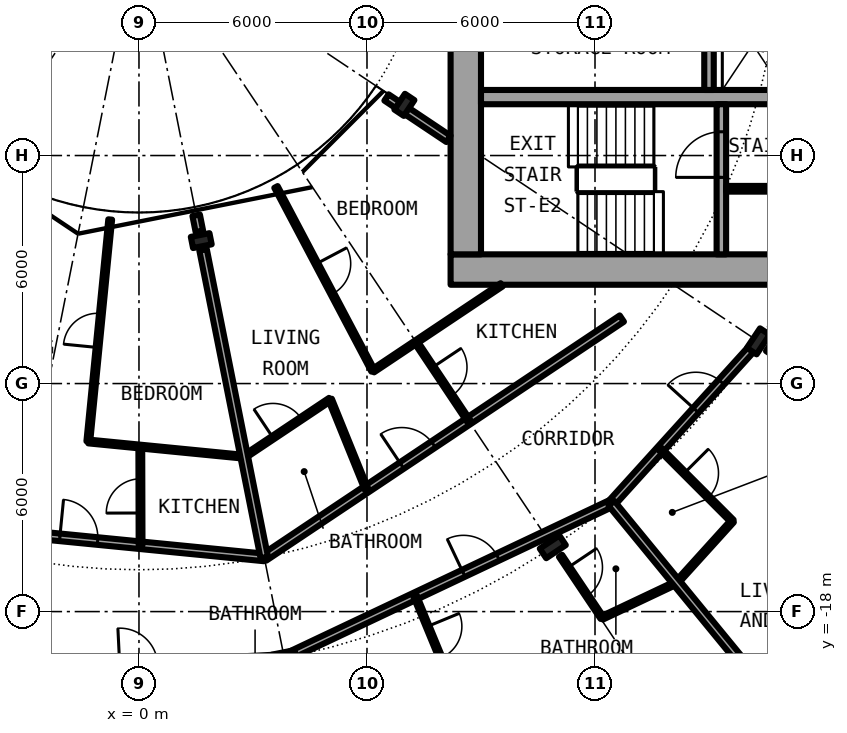
"""IFC4 building model, lengths in metres.
Left out: names, types, materials, properties, quantities, classifications, styles, units other than length and angle.
Written with IfcOpenShell. Run it as: python <this file> out.ifc"""

import sys

from ifc_helpers import new_model, si_unit, direction, frame, frame_2d, origin, origin_2d, place, context, subcontext, project, spatial, rectangle, i_section, extrude, element, fill, save


model = new_model("IFC4")
c1 = context("Model", 3, precision=1e-05, world=origin(), true_north=direction((0.0, 1.0)))
c2 = subcontext(c1, "Body", "Model", "MODEL_VIEW")
j1 = project(units=[si_unit("LENGTHUNIT", "METRE"), si_unit("PLANEANGLEUNIT", "RADIAN")], contexts=[c1])
p1 = place(None, origin())
s1 = spatial("IfcSite", under=j1, at=p1, CompositionType="ELEMENT")
p2 = place(p1, origin())
s2 = spatial("IfcBuilding", under=s1, at=p2, CompositionType="ELEMENT")
p3 = place(p2, frame((0.0, 0.0, 22.8)))
s3 = spatial("IfcBuildingStorey", under=s2, at=p3, CompositionType="ELEMENT", Elevation=22.8)
for number, where, z_axis, x_axis in (
    (1, (3.824, -19.223, 0.0), (0.0, 0.0, 1.0), (0.195, -0.981, 0.0)),
    (2, (10.889, -16.297, 0.0), (0.0, 0.0, 1.0), (0.556, -0.831, 0.0)),
    (3, (16.297, -10.889, 0.0), (0.0, 0.0, 1.0), (0.831, -0.556, 0.0)),
):
    element("IfcColumn", number, at=place(p3, frame(where, z_axis=z_axis, x_axis=x_axis)), inside=s3, PredefinedType="COLUMN", context=c2, shape_type="SweptSolid", body=[
        extrude(i_section(OverallWidth=0.305, OverallDepth=0.62, WebThickness=0.021, FlangeThickness=0.04, FilletRadius=0.027, at=origin_2d()), origin(), (0.0, 0.0, 1.0), 3.05),
    ])
for number, where, z_axis, x_axis in (
    (4, (1.639, -8.239, 0.0), (0.0, 0.0, 1.0), (0.195, -0.981, 0.0)),
    (5, (6.984, -4.667, 0.0), (0.0, 0.0, 1.0), (0.831, -0.556, 0.0)),
):
    element("IfcColumn", number, at=place(p3, frame(where, z_axis=z_axis, x_axis=x_axis)), inside=s3, PredefinedType="COLUMN", context=c2, shape_type="SweptSolid", body=[
        extrude(i_section(OverallWidth=0.3, OverallDepth=0.5, WebThickness=0.014, FlangeThickness=0.028, FilletRadius=0.027, at=origin_2d()), origin(), (0.0, 0.0, 1.0), 3.05),
    ])
p4 = place(p3, frame((8.2, -9.0, 0.0), z_axis=(0.0, 0.0, 1.0), x_axis=(1.0, 0.0, 0.0)))
e6 = element("IfcWall", 6, at=p4, inside=s3, PredefinedType="SHEAR", context=c2, shape_type="SweptSolid", body=[
    extrude(rectangle(XDim=14.2, YDim=0.8, at=frame_2d((7.1, 0.0))), origin(), (0.0, 0.0, 1.0), 3.05),
])
p5 = place(p4, frame((11.675, 0.0, 0.0)))
e7 = element("IfcOpeningElement", 7, at=p5, cuts=e6, PredefinedType="OPENING", context=c2, shape_type="SweptSolid", body=[
    extrude(rectangle(XDim=1.2, YDim=2.3, at=frame_2d((0.6, 1.15))), frame((0.0, 0.41, 0.0), z_axis=(0.0, -1.0, 0.0), x_axis=(1.0, 0.0, 0.0)), (0.0, 0.0, 1.0), 0.82),
])
p6 = place(p3, frame((8.6, -8.6, 0.0), z_axis=(0.0, 0.0, 1.0), x_axis=(0.0, 1.0, 0.0)))
e8 = element("IfcWall", 8, at=p6, inside=s3, PredefinedType="SHEAR", context=c2, shape_type="SweptSolid", body=[
    extrude(rectangle(XDim=17.2, YDim=0.8, at=frame_2d((8.6, 0.0))), origin(), (0.0, 0.0, 1.0), 3.05),
])
p7 = place(p6, frame((7.4, 0.0, 0.1)))
e9 = element("IfcOpeningElement", 9, at=p7, cuts=e8, PredefinedType="OPENING", context=c2, shape_type="SweptSolid", body=[
    extrude(rectangle(XDim=2.4, YDim=2.2, at=frame_2d((1.2, 1.1))), frame((0.0, 0.41, 0.0), z_axis=(0.0, -1.0, 0.0), x_axis=(1.0, 0.0, 0.0)), (0.0, 0.0, 1.0), 0.82),
])
p8 = place(p3, frame((9.0, -4.462, 0.0), z_axis=(0.0, 0.0, 1.0), x_axis=(1.0, 0.0, 0.0)))
e10 = element("IfcWall", 10, at=p8, inside=s3, PredefinedType="SHEAR", context=c2, shape_type="SweptSolid", body=[
    extrude(rectangle(XDim=10.15, YDim=0.375, at=frame_2d((5.075, 0.0))), origin(), (0.0, 0.0, 1.0), 3.05),
])
p9 = place(p3, frame((15.325, -8.6, 0.0), z_axis=(0.0, 0.0, 1.0), x_axis=(0.0, 1.0, 0.0)))
e11 = element("IfcWall", 11, at=p9, inside=s3, PredefinedType="SHEAR", context=c2, shape_type="SweptSolid", body=[
    extrude(rectangle(XDim=3.95, YDim=0.25, at=frame_2d((1.975, 0.0))), origin(), (0.0, 0.0, 1.0), 3.05),
])
p10 = place(p9, frame((2.025, 0.0, 0.0)))
e12 = element("IfcOpeningElement", 12, at=p10, cuts=e11, PredefinedType="OPENING", context=c2, shape_type="SweptSolid", body=[
    extrude(rectangle(XDim=1.2, YDim=2.3, at=frame_2d((0.6, 1.15))), frame((0.0, 0.135, 0.0), z_axis=(0.0, -1.0, 0.0), x_axis=(1.0, 0.0, 0.0)), (0.0, 0.0, 1.0), 0.27),
])
p11 = place(p3, frame((15.0, -1.825, 0.0), z_axis=(0.0, 0.0, 1.0), x_axis=(0.0, -1.0, 0.0)))
e13 = element("IfcWall", 13, at=p11, inside=s3, PredefinedType="SOLIDWALL", context=c2, shape_type="SweptSolid", body=[
    extrude(rectangle(XDim=2.45, YDim=0.25, at=frame_2d((1.225, 0.0))), origin(), (0.0, 0.0, 1.0), 2.7),
])
p12 = place(p3, frame((15.45, -6.875, 0.0), z_axis=(0.0, 0.0, 1.0), x_axis=(1.0, 0.0, 0.0)))
e14 = element("IfcWall", 14, at=p12, inside=s3, PredefinedType="PARTITIONING", context=c2, shape_type="SweptSolid", body=[
    extrude(rectangle(XDim=3.7, YDim=0.15, at=frame_2d((1.85, 0.0))), origin(), (0.0, 0.0, 1.0), 2.7),
])
p13 = place(p12, frame((1.4, 0.0, 0.0)))
e15 = element("IfcOpeningElement", 15, at=p13, cuts=e14, PredefinedType="OPENING", context=c2, shape_type="SweptSolid", body=[
    extrude(rectangle(XDim=0.9, YDim=2.3, at=frame_2d((0.45, 1.15))), frame((0.0, 0.085, 0.0), z_axis=(0.0, -1.0, 0.0), x_axis=(1.0, 0.0, 0.0)), (0.0, 0.0, 1.0), 0.17),
])
p14 = place(p3, frame((14.153, -17.234, 0.0), z_axis=(0.0, 0.0, 1.0), x_axis=(0.671144831591, 0.741326254107, 0.0)))
e16 = element("IfcWall", 16, at=p14, inside=s3, PredefinedType="PARTITIONING", context=c2, shape_type="SweptSolid", body=[
    extrude(rectangle(XDim=2.181, YDim=0.1, at=frame_2d((1.091, 0.0))), origin(), (0.0, 0.0, 1.0), 2.7),
])
p15 = place(p3, frame((12.188, -18.165, 0.0), z_axis=(0.0, 0.0, 1.0), x_axis=(0.903905215872, 0.427732814639, 0.0)))
e17 = element("IfcWall", 17, at=p15, inside=s3, PredefinedType="PARTITIONING", context=c2, shape_type="SweptSolid", body=[
    extrude(rectangle(XDim=2.167, YDim=0.1, at=frame_2d((1.083, 0.0))), origin(), (0.0, 0.0, 1.0), 2.7),
])
p16 = place(p3, frame((12.434, -15.151, 0.0), z_axis=(0.0, 0.0, 1.0), x_axis=(0.671514934772, 0.740991020444, 0.0)))
e18 = element("IfcWall", 18, at=p16, inside=s3, PredefinedType="PARTITIONING", context=c2, shape_type="SweptSolid", body=[
    extrude(rectangle(XDim=5.598, YDim=0.2, at=frame_2d((2.799, 0.0))), origin(), (0.0, 0.0, 1.0), 2.38),
])
p17 = place(p16, frame((3.305, 0.0, 0.0)))
e19 = element("IfcOpeningElement", 19, at=p17, cuts=e18, PredefinedType="OPENING", context=c2, shape_type="SweptSolid", body=[
    extrude(rectangle(XDim=1.0, YDim=2.3, at=frame_2d((0.5, 1.15))), frame((0.0, 0.11, 0.0), z_axis=(0.0, -1.0, 0.0), x_axis=(1.0, 0.0, 0.0)), (0.0, 0.0, 1.0), 0.22),
])
p18 = place(p3, frame((-10.741, -16.35, 0.0), z_axis=(0.0, 0.0, 1.0), x_axis=(0.941539496009, -0.336902623105, 0.0)))
e20 = element("IfcWall", 20, at=p18, inside=s3, PredefinedType="PARTITIONING", context=c2, shape_type="SweptSolid", body=[
    extrude(rectangle(XDim=9.368, YDim=0.2, at=frame_2d((4.684, 0.0))), origin(), (0.0, 0.0, 1.0), 2.38),
])
p19 = place(p18, frame((5.057, 0.0, 0.0)))
e21 = element("IfcOpeningElement", 21, at=p19, cuts=e20, PredefinedType="OPENING", context=c2, shape_type="SweptSolid", body=[
    extrude(rectangle(XDim=1.0, YDim=2.3, at=frame_2d((0.5, 1.15))), frame((0.0, 0.11, 0.0), z_axis=(0.0, -1.0, 0.0), x_axis=(1.0, 0.0, 0.0)), (0.0, 0.0, 1.0), 0.22),
])
p20 = place(p3, frame((3.966, -19.156, 0.0), z_axis=(0.0, 0.0, 1.0), x_axis=(0.90398275529, 0.427568916244, 0.0)))
e22 = element("IfcWall", 22, at=p20, inside=s3, PredefinedType="PARTITIONING", context=c2, shape_type="SweptSolid", body=[
    extrude(rectangle(XDim=9.372, YDim=0.2, at=frame_2d((4.686, 0.0))), origin(), (0.0, 0.0, 1.0), 2.38),
])
p21 = place(p20, frame((5.058, 0.0, 0.0)))
e23 = element("IfcOpeningElement", 23, at=p21, cuts=e22, PredefinedType="OPENING", context=c2, shape_type="SweptSolid", body=[
    extrude(rectangle(XDim=1.0, YDim=2.3, at=frame_2d((0.5, 1.15))), frame((0.0, 0.11, 0.0), z_axis=(0.0, -1.0, 0.0), x_axis=(1.0, 0.0, 0.0)), (0.0, 0.0, 1.0), 0.22),
])
p22 = place(p3, frame((-6.467, -15.615, 0.0), z_axis=(0.0, 0.0, 1.0), x_axis=(0.995201860711, -0.097843019361, 0.0)))
e24 = element("IfcWall", 24, at=p22, inside=s3, PredefinedType="PARTITIONING", context=c2, shape_type="SweptSolid", body=[
    extrude(rectangle(XDim=9.811, YDim=0.2, at=frame_2d((4.906, 0.0))), origin(), (0.0, 0.0, 1.0), 2.7),
])
p23 = place(p22, frame((4.405, 0.0, 0.0)))
e25 = element("IfcOpeningElement", 25, at=p23, cuts=e24, PredefinedType="OPENING", context=c2, shape_type="SweptSolid", body=[
    extrude(rectangle(XDim=1.0, YDim=2.3, at=frame_2d((0.5, 1.15))), frame((0.0, 0.11, 0.0), z_axis=(0.0, -1.0, 0.0), x_axis=(1.0, 0.0, 0.0)), (0.0, 0.0, 1.0), 0.22),
])
p24 = place(p3, frame((3.297, -16.575, 0.0), z_axis=(0.0, 0.0, 1.0), x_axis=(0.83154870872, 0.55545183862, 0.0)))
e26 = element("IfcWall", 26, at=p24, inside=s3, PredefinedType="PARTITIONING", context=c2, shape_type="SweptSolid", body=[
    extrude(rectangle(XDim=11.315, YDim=0.2, at=frame_2d((5.657, 0.0))), origin(), (0.0, 0.0, 1.0), 2.7),
])
p25 = place(p24, frame((4.352, 0.0, 0.0)))
e27 = element("IfcOpeningElement", 27, at=p25, cuts=e26, PredefinedType="OPENING", context=c2, shape_type="SweptSolid", body=[
    extrude(rectangle(XDim=1.0, YDim=2.3, at=frame_2d((0.5, 1.15))), frame((0.0, 0.11, 0.0), z_axis=(0.0, -1.0, 0.0), x_axis=(1.0, 0.0, 0.0)), (0.0, 0.0, 1.0), 0.22),
])
p26 = place(p3, frame((-1.33, -13.524, 0.0), z_axis=(0.0, 0.0, 1.0), x_axis=(0.995206960104, -0.097791137432, 0.0)))
e28 = element("IfcWall", 28, at=p26, inside=s3, PredefinedType="PARTITIONING", context=c2, shape_type="SweptSolid", body=[
    extrude(rectangle(XDim=4.122, YDim=0.1, at=frame_2d((2.061, 0.0))), origin(), (0.0, 0.0, 1.0), 2.7),
])
p27 = place(p3, frame((2.77, -13.927, 0.0), z_axis=(0.0, 0.0, 1.0), x_axis=(0.831538390496, 0.555467285384, 0.0)))
e29 = element("IfcWall", 29, at=p27, inside=s3, PredefinedType="PARTITIONING", context=c2, shape_type="SweptSolid", body=[
    extrude(rectangle(XDim=2.717, YDim=0.1, at=frame_2d((1.358, 0.0))), origin(), (0.0, 0.0, 1.0), 2.7),
])
p28 = place(p27, frame((0.908, 0.0, 0.0)))
e30 = element("IfcOpeningElement", 30, at=p28, cuts=e29, PredefinedType="OPENING", context=c2, shape_type="SweptSolid", body=[
    extrude(rectangle(XDim=0.9, YDim=2.3, at=frame_2d((0.45, 1.15))), frame((0.0, 0.06, 0.0), z_axis=(0.0, -1.0, 0.0), x_axis=(1.0, 0.0, 0.0)), (0.0, 0.0, 1.0), 0.12),
])
p29 = place(p3, frame((6.158, -11.664, 0.0), z_axis=(0.0, 0.0, 1.0), x_axis=(0.831459707426, 0.555585056429, 0.0)))
e31 = element("IfcWall", 31, at=p29, inside=s3, PredefinedType="PARTITIONING", context=c2, shape_type="SweptSolid", body=[
    extrude(rectangle(XDim=4.073, YDim=0.1, at=frame_2d((2.037, 0.0))), origin(), (0.0, 0.0, 1.0), 2.7),
])
p30 = place(p3, frame((6.513, -4.472, 0.0), z_axis=(0.0, 0.0, 1.0), x_axis=(0.831417956244, -0.555647533996, 0.0)))
e32 = element("IfcWall", 32, at=p30, inside=s3, PredefinedType="PARTITIONING", context=c2, shape_type="SweptSolid", body=[
    extrude(rectangle(XDim=1.962, YDim=0.2, at=frame_2d((0.981, 0.0))), origin(), (0.0, 0.0, 1.0), 2.7),
])
p31 = place(p3, frame((-1.333, -13.523, 0.0), z_axis=(0.0, 0.0, 1.0), x_axis=(0.098144281387, 0.995172196171, 0.0)))
e33 = element("IfcWall", 33, at=p31, inside=s3, PredefinedType="PARTITIONING", context=c2, shape_type="SweptSolid", body=[
    extrude(rectangle(XDim=5.868, YDim=0.1, at=frame_2d((2.934, 0.0))), origin(), (0.0, 0.0, 1.0), 2.7),
])
p32 = place(p31, frame((2.484, 0.0, 0.0)))
e34 = element("IfcOpeningElement", 34, at=p32, cuts=e33, PredefinedType="OPENING", context=c2, shape_type="SweptSolid", body=[
    extrude(rectangle(XDim=0.9, YDim=2.3, at=frame_2d((0.45, 1.15))), frame((0.0, 0.06, 0.0), z_axis=(0.0, -1.0, 0.0), x_axis=(1.0, 0.0, 0.0)), (0.0, 0.0, 1.0), 0.12),
])
p33 = place(p3, frame((0.042, -16.255, 0.0), z_axis=(0.0, 0.0, 1.0), x_axis=(-0.00272632248, 0.999996283576, 0.0)))
e35 = element("IfcWall", 35, at=p33, inside=s3, PredefinedType="PARTITIONING", context=c2, shape_type="SweptSolid", body=[
    extrude(rectangle(XDim=2.597, YDim=0.1, at=frame_2d((1.298, 0.0))), origin(), (0.0, 0.0, 1.0), 2.7),
])
p34 = place(p33, frame((0.849, 0.0, 0.0)))
e36 = element("IfcOpeningElement", 36, at=p34, cuts=e35, PredefinedType="OPENING", context=c2, shape_type="SweptSolid", body=[
    extrude(rectangle(XDim=0.9, YDim=2.3, at=frame_2d((0.45, 1.15))), frame((0.0, 0.06, 0.0), z_axis=(0.0, -1.0, 0.0), x_axis=(1.0, 0.0, 0.0)), (0.0, 0.0, 1.0), 0.12),
])
p35 = place(p3, frame((1.505, -7.572, 0.0), z_axis=(0.0, 0.0, 1.0), x_axis=(0.195788718323, -0.980646102209, 0.0)))
e37 = element("IfcWall", 37, at=p35, inside=s3, PredefinedType="PARTITIONING", context=c2, shape_type="SweptSolid", body=[
    extrude(rectangle(XDim=0.43, YDim=0.2, at=frame_2d((0.215, 0.0))), origin(), (0.0, 0.0, 1.0), 2.7),
])
p36 = place(p3, frame((1.687, -8.484, 0.0), z_axis=(0.0, 0.0, 1.0), x_axis=(0.195171317964, -0.980769165831, 0.0)))
e38 = element("IfcWall", 38, at=p36, inside=s3, PredefinedType="PARTITIONING", context=c2, shape_type="SweptSolid", body=[
    extrude(rectangle(XDim=8.25, YDim=0.2, at=frame_2d((4.125, 0.0))), origin(), (0.0, 0.0, 1.0), 2.7),
])
p37 = place(p3, frame((3.605, -6.827, 0.0), z_axis=(0.0, 0.0, 1.0), x_axis=(0.466976820365, -0.884269556889, 0.0)))
e39 = element("IfcWall", 39, at=p37, inside=s3, PredefinedType="PARTITIONING", context=c2, shape_type="SweptSolid", body=[
    extrude(rectangle(XDim=5.469, YDim=0.1, at=frame_2d((2.735, 0.0))), origin(), (0.0, 0.0, 1.0), 2.7),
])
p38 = place(p37, frame((2.284, 0.0, 0.0)))
e40 = element("IfcOpeningElement", 40, at=p38, cuts=e39, PredefinedType="OPENING", context=c2, shape_type="SweptSolid", body=[
    extrude(rectangle(XDim=0.9, YDim=2.3, at=frame_2d((0.45, 1.15))), frame((0.0, 0.06, 0.0), z_axis=(0.0, -1.0, 0.0), x_axis=(1.0, 0.0, 0.0)), (0.0, 0.0, 1.0), 0.12),
])
p39 = place(p3, frame((5.029, -12.418, 0.0), z_axis=(0.0, 0.0, 1.0), x_axis=(0.375649498413, -0.926761811008, 0.0)))
e41 = element("IfcWall", 41, at=p39, inside=s3, PredefinedType="PARTITIONING", context=c2, shape_type="SweptSolid", body=[
    extrude(rectangle(XDim=2.548, YDim=0.1, at=frame_2d((1.274, 0.0))), origin(), (0.0, 0.0, 1.0), 2.7),
])
p40 = place(p3, frame((7.268, -17.594, 0.0), z_axis=(0.0, 0.0, 1.0), x_axis=(0.381763497026, -0.924260045841, 0.0)))
e42 = element("IfcWall", 42, at=p40, inside=s3, PredefinedType="PARTITIONING", context=c2, shape_type="SweptSolid", body=[
    extrude(rectangle(XDim=8.138, YDim=0.1, at=frame_2d((4.069, 0.0))), origin(), (0.0, 0.0, 1.0), 2.7),
])
p41 = place(p40, frame((0.861, 0.0, 0.0)))
e43 = element("IfcOpeningElement", 43, at=p41, cuts=e42, PredefinedType="OPENING", context=c2, shape_type="SweptSolid", body=[
    extrude(rectangle(XDim=0.9, YDim=2.3, at=frame_2d((0.45, 1.15))), frame((0.0, 0.06, 0.0), z_axis=(0.0, -1.0, 0.0), x_axis=(1.0, 0.0, 0.0)), (0.0, 0.0, 1.0), 0.12),
])
p42 = place(p40, frame((4.93, 0.0, 0.0)))
e44 = element("IfcOpeningElement", 44, at=p42, cuts=e42, PredefinedType="OPENING", context=c2, shape_type="SweptSolid", body=[
    extrude(rectangle(XDim=0.9, YDim=2.3, at=frame_2d((0.45, 1.15))), frame((0.0, 0.06, 0.0), z_axis=(0.0, -1.0, 0.0), x_axis=(1.0, 0.0, 0.0)), (0.0, 0.0, 1.0), 0.12),
])
p43 = place(p3, frame((7.289, -10.908, 0.0), z_axis=(0.0, 0.0, 1.0), x_axis=(0.555625883274, -0.831432425297, 0.0)))
e45 = element("IfcWall", 45, at=p43, inside=s3, PredefinedType="PARTITIONING", context=c2, shape_type="SweptSolid", body=[
    extrude(rectangle(XDim=2.494, YDim=0.1, at=frame_2d((1.247, 0.0))), origin(), (0.0, 0.0, 1.0), 2.7),
])
p44 = place(p43, frame((0.797, 0.0, 0.0)))
e46 = element("IfcOpeningElement", 46, at=p44, cuts=e45, PredefinedType="OPENING", context=c2, shape_type="SweptSolid", body=[
    extrude(rectangle(XDim=0.9, YDim=2.3, at=frame_2d((0.45, 1.15))), frame((0.0, 0.06, 0.0), z_axis=(0.0, -1.0, 0.0), x_axis=(1.0, 0.0, 0.0)), (0.0, 0.0, 1.0), 0.12),
])
p45 = place(p3, frame((11.093, -16.533, 0.0), z_axis=(0.0, 0.0, 1.0), x_axis=(0.557134474719, -0.830422288405, 0.0)))
e47 = element("IfcWall", 47, at=p45, inside=s3, PredefinedType="PARTITIONING", context=c2, shape_type="SweptSolid", body=[
    extrude(rectangle(XDim=1.965, YDim=0.1, at=frame_2d((0.983, 0.0))), origin(), (0.0, 0.0, 1.0), 2.7),
])
p46 = place(p45, frame((0.366, 0.0, 0.0)))
e48 = element("IfcOpeningElement", 48, at=p46, cuts=e47, PredefinedType="OPENING", context=c2, shape_type="SweptSolid", body=[
    extrude(rectangle(XDim=0.9, YDim=2.3, at=frame_2d((0.45, 1.15))), frame((0.0, 0.06, 0.0), z_axis=(0.0, -1.0, 0.0), x_axis=(1.0, 0.0, 0.0)), (0.0, 0.0, 1.0), 0.12),
])
p47 = place(p3, frame((12.432, -15.152, 0.0), z_axis=(0.0, 0.0, 1.0), x_axis=(0.634353152115, -0.77304338714, 0.0)))
e49 = element("IfcWall", 49, at=p47, inside=s3, PredefinedType="PARTITIONING", context=c2, shape_type="SweptSolid", body=[
    extrude(rectangle(XDim=7.576, YDim=0.2, at=frame_2d((3.788, 0.0))), origin(), (0.0, 0.0, 1.0), 2.7),
])
p48 = place(p3, frame((13.723, -13.729, 0.0), z_axis=(0.0, 0.0, 1.0), x_axis=(0.706741540154, -0.707471833659, 0.0)))
e50 = element("IfcWall", 50, at=p48, inside=s3, PredefinedType="PARTITIONING", context=c2, shape_type="SweptSolid", body=[
    extrude(rectangle(XDim=2.674, YDim=0.1, at=frame_2d((1.337, 0.0))), origin(), (0.0, 0.0, 1.0), 2.7),
])
p49 = place(p48, frame((0.887, 0.0, 0.0)))
e51 = element("IfcOpeningElement", 51, at=p49, cuts=e50, PredefinedType="OPENING", context=c2, shape_type="SweptSolid", body=[
    extrude(rectangle(XDim=0.9, YDim=2.3, at=frame_2d((0.45, 1.15))), frame((0.0, 0.06, 0.0), z_axis=(0.0, -1.0, 0.0), x_axis=(1.0, 0.0, 0.0)), (0.0, 0.0, 1.0), 0.12),
])
p50 = place(p3, frame((16.555, -11.061, 0.0), z_axis=(0.0, 0.0, 1.0), x_axis=(0.831465568067, -0.555576285599, 0.0)))
e52 = element("IfcWall", 52, at=p50, inside=s3, PredefinedType="PARTITIONING", context=c2, shape_type="SweptSolid", body=[
    extrude(rectangle(XDim=7.264, YDim=0.2, at=frame_2d((3.632, 0.0))), origin(), (0.0, 0.0, 1.0), 2.7),
])
p51 = place(p10, origin())
e53 = element("IfcDoor", 53, at=p51, inside=s3, OperationType="SINGLE_SWING_LEFT", PredefinedType="DOOR", context=c2, shape_type="SweptSolid", body=[
    extrude(rectangle(XDim=1.2, YDim=2.3, at=frame_2d((0.6, 1.15))), frame((0.0, 0.025, 0.0), z_axis=(0.0, -1.0, 0.0), x_axis=(1.0, 0.0, 0.0)), (0.0, 0.0, 1.0), 0.05),
])
fill(e12, e53)
p52 = place(p21, origin())
e54 = element("IfcDoor", 54, at=p52, inside=s3, OperationType="SINGLE_SWING_RIGHT", PredefinedType="DOOR", context=c2, shape_type="SweptSolid", body=[
    extrude(rectangle(XDim=1.0, YDim=2.3, at=frame_2d((0.5, 1.15))), frame((0.0, 0.025, 0.0), z_axis=(0.0, -1.0, 0.0), x_axis=(1.0, 0.0, 0.0)), (0.0, 0.0, 1.0), 0.05),
])
fill(e23, e54)
p53 = place(p46, origin())
e55 = element("IfcDoor", 55, at=p53, inside=s3, OperationType="SINGLE_SWING_LEFT", PredefinedType="DOOR", context=c2, shape_type="SweptSolid", body=[
    extrude(rectangle(XDim=0.9, YDim=2.3, at=frame_2d((0.45, 1.15))), frame((0.0, 0.025, 0.0), z_axis=(0.0, -1.0, 0.0), x_axis=(1.0, 0.0, 0.0)), (0.0, 0.0, 1.0), 0.05),
])
fill(e48, e55)
p54 = place(p41, origin())
e56 = element("IfcDoor", 56, at=p54, inside=s3, OperationType="SINGLE_SWING_LEFT", PredefinedType="DOOR", context=c2, shape_type="SweptSolid", body=[
    extrude(rectangle(XDim=0.9, YDim=2.3, at=frame_2d((0.45, 1.15))), frame((0.0, 0.025, 0.0), z_axis=(0.0, -1.0, 0.0), x_axis=(1.0, 0.0, 0.0)), (0.0, 0.0, 1.0), 0.05),
])
fill(e43, e56)
p55 = place(p17, origin())
e57 = element("IfcDoor", 57, at=p55, inside=s3, OperationType="SINGLE_SWING_RIGHT", PredefinedType="DOOR", context=c2, shape_type="SweptSolid", body=[
    extrude(rectangle(XDim=1.0, YDim=2.3, at=frame_2d((0.5, 1.15))), frame((0.0, 0.025, 0.0), z_axis=(0.0, -1.0, 0.0), x_axis=(1.0, 0.0, 0.0)), (0.0, 0.0, 1.0), 0.05),
])
fill(e19, e57)
p56 = place(p49, origin())
e58 = element("IfcDoor", 58, at=p56, inside=s3, OperationType="SINGLE_SWING_RIGHT", PredefinedType="DOOR", context=c2, shape_type="SweptSolid", body=[
    extrude(rectangle(XDim=0.9, YDim=2.3, at=frame_2d((0.45, 1.15))), frame((0.0, 0.025, 0.0), z_axis=(0.0, -1.0, 0.0), x_axis=(1.0, 0.0, 0.0)), (0.0, 0.0, 1.0), 0.05),
])
fill(e51, e58)
p57 = place(p23, origin())
e59 = element("IfcDoor", 59, at=p57, inside=s3, OperationType="SINGLE_SWING_LEFT", PredefinedType="DOOR", context=c2, shape_type="SweptSolid", body=[
    extrude(rectangle(XDim=1.0, YDim=2.3, at=frame_2d((0.5, 1.15))), frame((0.0, 0.025, 0.0), z_axis=(0.0, -1.0, 0.0), x_axis=(1.0, 0.0, 0.0)), (0.0, 0.0, 1.0), 0.05),
])
fill(e25, e59)
p58 = place(p34, origin())
e60 = element("IfcDoor", 60, at=p58, inside=s3, OperationType="SINGLE_SWING_RIGHT", PredefinedType="DOOR", context=c2, shape_type="SweptSolid", body=[
    extrude(rectangle(XDim=0.9, YDim=2.3, at=frame_2d((0.45, 1.15))), frame((0.0, 0.025, 0.0), z_axis=(0.0, -1.0, 0.0), x_axis=(1.0, 0.0, 0.0)), (0.0, 0.0, 1.0), 0.05),
])
fill(e36, e60)
p59 = place(p32, origin())
e61 = element("IfcDoor", 61, at=p59, inside=s3, OperationType="SINGLE_SWING_RIGHT", PredefinedType="DOOR", context=c2, shape_type="SweptSolid", body=[
    extrude(rectangle(XDim=0.9, YDim=2.3, at=frame_2d((0.45, 1.15))), frame((0.0, 0.025, 0.0), z_axis=(0.0, -1.0, 0.0), x_axis=(1.0, 0.0, 0.0)), (0.0, 0.0, 1.0), 0.05),
])
fill(e34, e61)
p60 = place(p25, origin())
e62 = element("IfcDoor", 62, at=p60, inside=s3, OperationType="SINGLE_SWING_LEFT", PredefinedType="DOOR", context=c2, shape_type="SweptSolid", body=[
    extrude(rectangle(XDim=1.0, YDim=2.3, at=frame_2d((0.5, 1.15))), frame((0.0, 0.025, 0.0), z_axis=(0.0, -1.0, 0.0), x_axis=(1.0, 0.0, 0.0)), (0.0, 0.0, 1.0), 0.05),
])
fill(e27, e62)
p61 = place(p28, origin())
e63 = element("IfcDoor", 63, at=p61, inside=s3, OperationType="SINGLE_SWING_RIGHT", PredefinedType="DOOR", context=c2, shape_type="SweptSolid", body=[
    extrude(rectangle(XDim=0.9, YDim=2.3, at=frame_2d((0.45, 1.15))), frame((0.0, 0.025, 0.0), z_axis=(0.0, -1.0, 0.0), x_axis=(1.0, 0.0, 0.0)), (0.0, 0.0, 1.0), 0.05),
])
fill(e30, e63)
p62 = place(p44, origin())
e64 = element("IfcDoor", 64, at=p62, inside=s3, OperationType="SINGLE_SWING_LEFT", PredefinedType="DOOR", context=c2, shape_type="SweptSolid", body=[
    extrude(rectangle(XDim=0.9, YDim=2.3, at=frame_2d((0.45, 1.15))), frame((0.0, 0.025, 0.0), z_axis=(0.0, -1.0, 0.0), x_axis=(1.0, 0.0, 0.0)), (0.0, 0.0, 1.0), 0.05),
])
fill(e46, e64)
p63 = place(p38, origin())
e65 = element("IfcDoor", 65, at=p63, inside=s3, OperationType="SINGLE_SWING_RIGHT", PredefinedType="DOOR", context=c2, shape_type="SweptSolid", body=[
    extrude(rectangle(XDim=0.9, YDim=2.3, at=frame_2d((0.45, 1.15))), frame((0.0, 0.025, 0.0), z_axis=(0.0, -1.0, 0.0), x_axis=(1.0, 0.0, 0.0)), (0.0, 0.0, 1.0), 0.05),
])
fill(e40, e65)
save(model, sys.argv[1])
